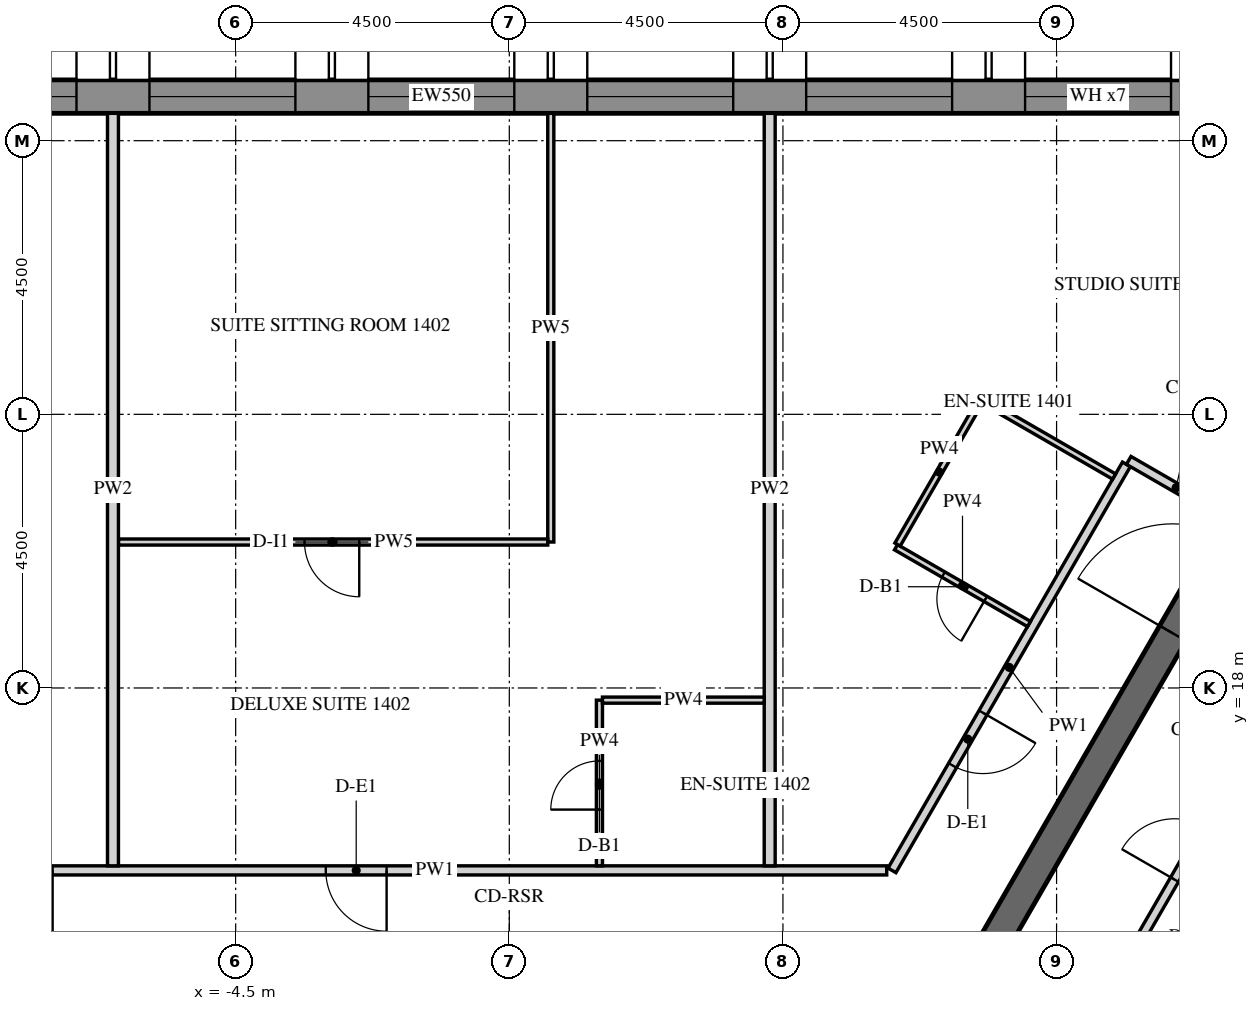
"""IFC4 building model, lengths in metres.
Left out: names, types, materials, properties, quantities, classifications, styles, units other than length and angle.
Written with IfcOpenShell. Run it as: python <this file> out.ifc"""

import sys

from ifc_helpers import new_model, si_unit, direction, frame, frame_2d, origin, place, context, subcontext, project, spatial, polyline, rectangle, outline, extrude, element, fill, save


model = new_model("IFC4")
c1 = context("Model", 3, precision=1e-05, world=origin(), true_north=direction((0.0, 1.0)))
c2 = subcontext(c1, "Body", "Model", "MODEL_VIEW")
j1 = project(units=[si_unit("LENGTHUNIT", "METRE"), si_unit("PLANEANGLEUNIT", "RADIAN")], contexts=[c1])
p1 = place(None, origin())
s1 = spatial("IfcSite", under=j1, at=p1, CompositionType="ELEMENT")
p2 = place(p1, origin())
s2 = spatial("IfcBuilding", under=s1, at=p2, CompositionType="ELEMENT")
p3 = place(p2, frame((0.0, 0.0, 183.9)))
s3 = spatial("IfcBuildingStorey", under=s2, at=p3, CompositionType="ELEMENT", Elevation=183.9)
p4 = place(p3, frame((12.761, 27.725, -0.15), z_axis=(0.0, 0.0, 1.0), x_axis=(-1.0, 0.0, 0.0)))
e1 = element("IfcWall", 1, at=p4, inside=s3, PredefinedType="SOLIDWALL", context=c2, shape_type="SweptSolid", body=[
    extrude(outline(polyline([(-0.022, -0.275), (27.783, -0.275), (27.732, 0.275), (0.022, 0.275), (-0.022, -0.275)])), origin(), (0.0, 0.0, 1.0), 3.9),
])
p5 = place(p4, frame((1.879, 0.0, 1.05)))
e2 = element("IfcOpeningElement", 2, at=p5, cuts=e1, PredefinedType="OPENING", context=c2, shape_type="SweptSolid", body=[
    extrude(rectangle(XDim=2.4, YDim=2.4, at=frame_2d((1.2, 1.2))), frame((0.0, 0.285, 0.0), z_axis=(0.0, -1.0, 0.0), x_axis=(1.0, 0.0, 0.0)), (0.0, 0.0, 1.0), 0.57),
])
p6 = place(p4, frame((5.479, 0.0, 1.05)))
e3 = element("IfcOpeningElement", 3, at=p6, cuts=e1, PredefinedType="OPENING", context=c2, shape_type="SweptSolid", body=[
    extrude(rectangle(XDim=2.4, YDim=2.4, at=frame_2d((1.2, 1.2))), frame((0.0, 0.285, 0.0), z_axis=(0.0, -1.0, 0.0), x_axis=(1.0, 0.0, 0.0)), (0.0, 0.0, 1.0), 0.57),
])
p7 = place(p4, frame((9.079, 0.0, 1.05)))
e4 = element("IfcOpeningElement", 4, at=p7, cuts=e1, PredefinedType="OPENING", context=c2, shape_type="SweptSolid", body=[
    extrude(rectangle(XDim=2.4, YDim=2.4, at=frame_2d((1.2, 1.2))), frame((0.0, 0.285, 0.0), z_axis=(0.0, -1.0, 0.0), x_axis=(1.0, 0.0, 0.0)), (0.0, 0.0, 1.0), 0.57),
])
p8 = place(p4, frame((12.679, 0.0, 1.05)))
e5 = element("IfcOpeningElement", 5, at=p8, cuts=e1, PredefinedType="OPENING", context=c2, shape_type="SweptSolid", body=[
    extrude(rectangle(XDim=2.4, YDim=2.4, at=frame_2d((1.2, 1.2))), frame((0.0, 0.285, 0.0), z_axis=(0.0, -1.0, 0.0), x_axis=(1.0, 0.0, 0.0)), (0.0, 0.0, 1.0), 0.57),
])
p9 = place(p4, frame((16.279, 0.0, 1.05)))
e6 = element("IfcOpeningElement", 6, at=p9, cuts=e1, PredefinedType="OPENING", context=c2, shape_type="SweptSolid", body=[
    extrude(rectangle(XDim=2.4, YDim=2.4, at=frame_2d((1.2, 1.2))), frame((0.0, 0.285, 0.0), z_axis=(0.0, -1.0, 0.0), x_axis=(1.0, 0.0, 0.0)), (0.0, 0.0, 1.0), 0.57),
])
p10 = place(p4, frame((19.879, 0.0, 1.05)))
e7 = element("IfcOpeningElement", 7, at=p10, cuts=e1, PredefinedType="OPENING", context=c2, shape_type="SweptSolid", body=[
    extrude(rectangle(XDim=2.4, YDim=2.4, at=frame_2d((1.2, 1.2))), frame((0.0, 0.285, 0.0), z_axis=(0.0, -1.0, 0.0), x_axis=(1.0, 0.0, 0.0)), (0.0, 0.0, 1.0), 0.57),
])
p11 = place(p4, frame((23.479, 0.0, 1.05)))
e8 = element("IfcOpeningElement", 8, at=p11, cuts=e1, PredefinedType="OPENING", context=c2, shape_type="SweptSolid", body=[
    extrude(rectangle(XDim=2.4, YDim=2.4, at=frame_2d((1.2, 1.2))), frame((0.0, 0.285, 0.0), z_axis=(0.0, -1.0, 0.0), x_axis=(1.0, 0.0, 0.0)), (0.0, 0.0, 1.0), 0.57),
])
p12 = place(p3, frame((7.506, 13.0, -0.15), z_axis=(0.0, 0.0, 1.0), x_axis=(0.499988271576, 0.866032175087, 0.0)))
e9 = element("IfcWall", 9, at=p12, inside=s3, PredefinedType="SHEAR", context=c2, shape_type="SweptSolid", body=[
    extrude(rectangle(XDim=15.424, YDim=0.5, at=frame_2d((7.712, 0.0))), origin(), (0.0, 0.0, 1.0), 3.9),
])
p13 = place(p12, frame((6.812, 0.0, 0.15)))
e10 = element("IfcOpeningElement", 10, at=p13, cuts=e9, PredefinedType="OPENING", context=c2, shape_type="SweptSolid", body=[
    extrude(rectangle(XDim=1.8, YDim=2.4, at=frame_2d((0.9, 1.2))), frame((0.0, 0.26, 0.0), z_axis=(0.0, -1.0, 0.0), x_axis=(1.0, 0.0, 0.0)), (0.0, 0.0, 1.0), 0.52),
])
p14 = place(p3, frame((10.149, 21.678, 0.0), z_axis=(0.0, 0.0, 1.0), x_axis=(-0.499993780622, -0.866028994514, 0.0)))
e11 = element("IfcWall", 11, at=p14, inside=s3, PredefinedType="PARTITIONING", context=c2, shape_type="SweptSolid", body=[
    extrude(rectangle(XDim=7.711, YDim=0.15, at=frame_2d((3.855, 0.0))), origin(), (0.0, 0.0, 1.0), 2.988),
])
p15 = place(p14, frame((4.718, 0.0, 0.0)))
e12 = element("IfcOpeningElement", 12, at=p15, cuts=e11, PredefinedType="OPENING", context=c2, shape_type="SweptSolid", body=[
    extrude(rectangle(XDim=1.0, YDim=2.1, at=frame_2d((0.5, 1.05))), frame((0.0, 0.085, 0.0), z_axis=(0.0, -1.0, 0.0), x_axis=(1.0, 0.0, 0.0)), (0.0, 0.0, 1.0), 0.17),
])
p16 = place(p3, frame((6.207, 15.0, 0.0), z_axis=(0.0, 0.0, 1.0), x_axis=(-1.0, 0.0, 0.0)))
e13 = element("IfcWall", 13, at=p16, inside=s3, PredefinedType="PARTITIONING", context=c2, shape_type="SweptSolid", body=[
    extrude(rectangle(XDim=14.867, YDim=0.15, at=frame_2d((7.433, 0.0))), origin(), (0.0, 0.0, 1.0), 2.988),
])
p17 = place(p16, frame((8.224, 0.0, 0.0)))
e14 = element("IfcOpeningElement", 14, at=p17, cuts=e13, PredefinedType="OPENING", context=c2, shape_type="SweptSolid", body=[
    extrude(rectangle(XDim=1.0, YDim=2.1, at=frame_2d((0.5, 1.05))), frame((0.0, 0.085, 0.0), z_axis=(0.0, -1.0, 0.0), x_axis=(1.0, 0.0, 0.0)), (0.0, 0.0, 1.0), 0.17),
])
p18 = place(p16, frame((13.717, 0.0, 0.0)))
e15 = element("IfcOpeningElement", 15, at=p18, cuts=e13, PredefinedType="OPENING", context=c2, shape_type="SweptSolid", body=[
    extrude(rectangle(XDim=1.0, YDim=2.1, at=frame_2d((0.5, 1.05))), frame((0.0, 0.085, 0.0), z_axis=(0.0, -1.0, 0.0), x_axis=(1.0, 0.0, 0.0)), (0.0, 0.0, 1.0), 0.17),
])
p19 = place(p3, frame((11.745, 20.843, 0.0), z_axis=(0.0, 0.0, 1.0), x_axis=(-0.865989075817, 0.500062916607, 0.0)))
e16 = element("IfcWall", 16, at=p19, inside=s3, PredefinedType="PARTITIONING", context=c2, shape_type="SweptSolid", body=[
    extrude(rectangle(XDim=1.8, YDim=0.15, at=frame_2d((0.9, 0.0))), origin(), (0.0, 0.0, 1.0), 2.988),
])
p20 = place(p3, frame((9.887, 13.025, 0.0), z_axis=(0.0, 0.0, 1.0), x_axis=(0.499985955615, 0.866033512162, 0.0)))
e17 = element("IfcWall", 17, at=p20, inside=s3, PredefinedType="PARTITIONING", context=c2, shape_type="SweptSolid", body=[
    extrude(rectangle(XDim=7.699, YDim=0.15, at=frame_2d((3.85, 0.0))), origin(), (0.0, 0.0, 1.0), 2.988),
])
p21 = place(p20, frame((2.106, 0.0, 0.0)))
e18 = element("IfcOpeningElement", 18, at=p21, cuts=e17, PredefinedType="OPENING", context=c2, shape_type="SweptSolid", body=[
    extrude(rectangle(XDim=1.0, YDim=2.1, at=frame_2d((0.5, 1.05))), frame((0.0, 0.085, 0.0), z_axis=(0.0, -1.0, 0.0), x_axis=(1.0, 0.0, 0.0)), (0.0, 0.0, 1.0), 0.17),
])
p22 = place(p3, frame((8.546, 19.052, 0.0), z_axis=(0.0, 0.0, 1.0), x_axis=(-0.866039067339, 0.499976333282, 0.0)))
e19 = element("IfcWall", 19, at=p22, inside=s3, PredefinedType="PARTITIONING", context=c2, shape_type="SweptSolid", body=[
    extrude(rectangle(XDim=2.525, YDim=0.1, at=frame_2d((1.262, 0.0))), origin(), (0.0, 0.0, 1.0), 2.988),
])
p23 = place(p22, frame((0.825, 0.0, 0.0)))
e20 = element("IfcOpeningElement", 20, at=p23, cuts=e19, PredefinedType="OPENING", context=c2, shape_type="SweptSolid", body=[
    extrude(rectangle(XDim=0.8, YDim=2.1, at=frame_2d((0.4, 1.05))), frame((0.0, 0.06, 0.0), z_axis=(0.0, -1.0, 0.0), x_axis=(1.0, 0.0, 0.0)), (0.0, 0.0, 1.0), 0.12),
])
p24 = place(p3, frame((6.385, 20.358, 0.0), z_axis=(0.0, 0.0, 1.0), x_axis=(0.499996545922, 0.866027397988, 0.0)))
e21 = element("IfcWall", 21, at=p24, inside=s3, PredefinedType="PARTITIONING", context=c2, shape_type="SweptSolid", body=[
    extrude(rectangle(XDim=2.75, YDim=0.1, at=frame_2d((1.375, 0.0))), origin(), (0.0, 0.0, 1.0), 2.988),
])
p25 = place(p3, frame((7.803, 22.715, 0.0), z_axis=(0.0, 0.0, 1.0), x_axis=(0.866006523861, -0.500032699561, 0.0)))
e22 = element("IfcWall", 22, at=p25, inside=s3, PredefinedType="PARTITIONING", context=c2, shape_type="SweptSolid", body=[
    extrude(rectangle(XDim=2.475, YDim=0.1, at=frame_2d((1.237, 0.0))), origin(), (0.0, 0.0, 1.0), 2.988),
])
p26 = place(p3, frame((4.282, 27.45, 0.0), z_axis=(0.0, 0.0, 1.0), x_axis=(0.0, -1.0, 0.0)))
e23 = element("IfcWall", 23, at=p26, inside=s3, PredefinedType="PARTITIONING", context=c2, shape_type="SweptSolid", body=[
    extrude(rectangle(XDim=12.375, YDim=0.18, at=frame_2d((6.188, 0.0))), origin(), (0.0, 0.0, 1.0), 2.988),
])
p27 = place(p3, frame((1.482, 15.075, 0.0), z_axis=(0.0, 0.0, 1.0), x_axis=(0.0, 1.0, 0.0)))
e24 = element("IfcWall", 24, at=p27, inside=s3, PredefinedType="PARTITIONING", context=c2, shape_type="SweptSolid", body=[
    extrude(rectangle(XDim=2.725, YDim=0.1, at=frame_2d((1.363, 0.0))), origin(), (0.0, 0.0, 1.0), 2.988),
])
p28 = place(p27, frame((0.925, 0.0, 0.0)))
e25 = element("IfcOpeningElement", 25, at=p28, cuts=e24, PredefinedType="OPENING", context=c2, shape_type="SweptSolid", body=[
    extrude(rectangle(XDim=0.8, YDim=2.1, at=frame_2d((0.4, 1.05))), frame((0.0, 0.06, 0.0), z_axis=(0.0, -1.0, 0.0), x_axis=(1.0, 0.0, 0.0)), (0.0, 0.0, 1.0), 0.12),
])
p29 = place(p3, frame((1.532, 17.8, 0.0), z_axis=(0.0, 0.0, 1.0), x_axis=(1.0, 0.0, 0.0)))
e26 = element("IfcWall", 26, at=p29, inside=s3, PredefinedType="PARTITIONING", context=c2, shape_type="SweptSolid", body=[
    extrude(rectangle(XDim=2.66, YDim=0.1, at=frame_2d((1.33, 0.0))), origin(), (0.0, 0.0, 1.0), 2.988),
])
p30 = place(p3, frame((0.682, 27.45, 0.0), z_axis=(0.0, 0.0, 1.0), x_axis=(0.0, -1.0, 0.0)))
e27 = element("IfcWall", 27, at=p30, inside=s3, PredefinedType="PARTITIONING", context=c2, shape_type="SweptSolid", body=[
    extrude(rectangle(XDim=7.05, YDim=0.1, at=frame_2d((3.525, 0.0))), origin(), (0.0, 0.0, 1.0), 2.988),
])
p31 = place(p3, frame((0.632, 20.4, 0.0), z_axis=(0.0, 0.0, 1.0), x_axis=(-1.0, 0.0, 0.0)))
e28 = element("IfcWall", 28, at=p31, inside=s3, PredefinedType="PARTITIONING", context=c2, shape_type="SweptSolid", body=[
    extrude(rectangle(XDim=7.06, YDim=0.1, at=frame_2d((3.53, 0.0))), origin(), (0.0, 0.0, 1.0), 2.988),
])
p32 = place(p31, frame((3.1, 0.0, 0.0)))
e29 = element("IfcOpeningElement", 29, at=p32, cuts=e28, PredefinedType="OPENING", context=c2, shape_type="SweptSolid", body=[
    extrude(rectangle(XDim=0.9, YDim=2.1, at=frame_2d((0.45, 1.05))), frame((0.0, 0.06, 0.0), z_axis=(0.0, -1.0, 0.0), x_axis=(1.0, 0.0, 0.0)), (0.0, 0.0, 1.0), 0.12),
])
p33 = place(p3, frame((-6.518, 27.45, 0.0), z_axis=(0.0, 0.0, 1.0), x_axis=(0.0, -1.0, 0.0)))
e30 = element("IfcWall", 30, at=p33, inside=s3, PredefinedType="PARTITIONING", context=c2, shape_type="SweptSolid", body=[
    extrude(rectangle(XDim=12.375, YDim=0.18, at=frame_2d((6.188, 0.0))), origin(), (0.0, 0.0, 1.0), 2.988),
])
p34 = place(p3, frame((20.363, 18.9, 0.0), z_axis=(0.0, 0.0, 1.0), x_axis=(-0.829027307641, -0.559208121531, 0.0)))
e31 = element("IfcWall", 31, at=p34, inside=s3, PredefinedType="PARTITIONING", context=c2, shape_type="SweptSolid", body=[
    extrude(rectangle(XDim=12.039, YDim=0.18, at=frame_2d((6.02, 0.0))), origin(), (0.0, 0.0, 1.0), 2.988),
])
p35 = place(p5, frame((0.0, 0.205, 0.0)))
e32 = element("IfcWindow", 32, at=p35, inside=s3, PartitioningType="DOUBLE_PANEL_VERTICAL", PredefinedType="WINDOW", context=c2, shape_type="SweptSolid", body=[
    extrude(rectangle(XDim=2.4, YDim=2.4, at=frame_2d((1.2, 1.2))), frame((0.0, 0.03, 0.0), z_axis=(0.0, -1.0, 0.0), x_axis=(1.0, 0.0, 0.0)), (0.0, 0.0, 1.0), 0.06),
])
fill(e2, e32)
p36 = place(p6, frame((0.0, 0.205, 0.0)))
e33 = element("IfcWindow", 33, at=p36, inside=s3, PartitioningType="DOUBLE_PANEL_VERTICAL", PredefinedType="WINDOW", context=c2, shape_type="SweptSolid", body=[
    extrude(rectangle(XDim=2.4, YDim=2.4, at=frame_2d((1.2, 1.2))), frame((0.0, 0.03, 0.0), z_axis=(0.0, -1.0, 0.0), x_axis=(1.0, 0.0, 0.0)), (0.0, 0.0, 1.0), 0.06),
])
fill(e3, e33)
p37 = place(p7, frame((0.0, 0.205, 0.0)))
e34 = element("IfcWindow", 34, at=p37, inside=s3, PartitioningType="DOUBLE_PANEL_VERTICAL", PredefinedType="WINDOW", context=c2, shape_type="SweptSolid", body=[
    extrude(rectangle(XDim=2.4, YDim=2.4, at=frame_2d((1.2, 1.2))), frame((0.0, 0.03, 0.0), z_axis=(0.0, -1.0, 0.0), x_axis=(1.0, 0.0, 0.0)), (0.0, 0.0, 1.0), 0.06),
])
fill(e4, e34)
p38 = place(p8, frame((0.0, 0.205, 0.0)))
e35 = element("IfcWindow", 35, at=p38, inside=s3, PartitioningType="DOUBLE_PANEL_VERTICAL", PredefinedType="WINDOW", context=c2, shape_type="SweptSolid", body=[
    extrude(rectangle(XDim=2.4, YDim=2.4, at=frame_2d((1.2, 1.2))), frame((0.0, 0.03, 0.0), z_axis=(0.0, -1.0, 0.0), x_axis=(1.0, 0.0, 0.0)), (0.0, 0.0, 1.0), 0.06),
])
fill(e5, e35)
p39 = place(p9, frame((0.0, 0.205, 0.0)))
e36 = element("IfcWindow", 36, at=p39, inside=s3, PartitioningType="DOUBLE_PANEL_VERTICAL", PredefinedType="WINDOW", context=c2, shape_type="SweptSolid", body=[
    extrude(rectangle(XDim=2.4, YDim=2.4, at=frame_2d((1.2, 1.2))), frame((0.0, 0.03, 0.0), z_axis=(0.0, -1.0, 0.0), x_axis=(1.0, 0.0, 0.0)), (0.0, 0.0, 1.0), 0.06),
])
fill(e6, e36)
p40 = place(p10, frame((0.0, 0.205, 0.0)))
e37 = element("IfcWindow", 37, at=p40, inside=s3, PartitioningType="DOUBLE_PANEL_VERTICAL", PredefinedType="WINDOW", context=c2, shape_type="SweptSolid", body=[
    extrude(rectangle(XDim=2.4, YDim=2.4, at=frame_2d((1.2, 1.2))), frame((0.0, 0.03, 0.0), z_axis=(0.0, -1.0, 0.0), x_axis=(1.0, 0.0, 0.0)), (0.0, 0.0, 1.0), 0.06),
])
fill(e7, e37)
p41 = place(p13, origin())
e38 = element("IfcDoor", 38, at=p41, inside=s3, OperationType="DOUBLE_DOOR_SINGLE_SWING", PredefinedType="DOOR", context=c2, shape_type="SweptSolid", body=[
    extrude(rectangle(XDim=1.8, YDim=2.4, at=frame_2d((0.9, 1.2))), frame((0.0, 0.025, 0.0), z_axis=(0.0, -1.0, 0.0), x_axis=(1.0, 0.0, 0.0)), (0.0, 0.0, 1.0), 0.05),
])
fill(e10, e38)
p42 = place(p15, origin())
e39 = element("IfcDoor", 39, at=p42, inside=s3, OperationType="SINGLE_SWING_LEFT", PredefinedType="DOOR", context=c2, shape_type="SweptSolid", body=[
    extrude(rectangle(XDim=1.0, YDim=2.1, at=frame_2d((0.5, 1.05))), frame((0.0, 0.025, 0.0), z_axis=(0.0, -1.0, 0.0), x_axis=(1.0, 0.0, 0.0)), (0.0, 0.0, 1.0), 0.05),
])
fill(e12, e39)
p43 = place(p23, origin())
e40 = element("IfcDoor", 40, at=p43, inside=s3, OperationType="SINGLE_SWING_RIGHT", PredefinedType="DOOR", context=c2, shape_type="SweptSolid", body=[
    extrude(rectangle(XDim=0.8, YDim=2.1, at=frame_2d((0.4, 1.05))), frame((0.0, 0.025, 0.0), z_axis=(0.0, -1.0, 0.0), x_axis=(1.0, 0.0, 0.0)), (0.0, 0.0, 1.0), 0.05),
])
fill(e20, e40)
p44 = place(p17, origin())
e41 = element("IfcDoor", 41, at=p44, inside=s3, OperationType="SINGLE_SWING_RIGHT", PredefinedType="DOOR", context=c2, shape_type="SweptSolid", body=[
    extrude(rectangle(XDim=1.0, YDim=2.1, at=frame_2d((0.5, 1.05))), frame((0.0, 0.025, 0.0), z_axis=(0.0, -1.0, 0.0), x_axis=(1.0, 0.0, 0.0)), (0.0, 0.0, 1.0), 0.05),
])
fill(e14, e41)
p45 = place(p28, origin())
e42 = element("IfcDoor", 42, at=p45, inside=s3, OperationType="SINGLE_SWING_RIGHT", PredefinedType="DOOR", context=c2, shape_type="SweptSolid", body=[
    extrude(rectangle(XDim=0.8, YDim=2.1, at=frame_2d((0.4, 1.05))), frame((0.0, 0.025, 0.0), z_axis=(0.0, -1.0, 0.0), x_axis=(1.0, 0.0, 0.0)), (0.0, 0.0, 1.0), 0.05),
])
fill(e25, e42)
p46 = place(p32, origin())
e43 = element("IfcDoor", 43, at=p46, inside=s3, OperationType="SINGLE_SWING_LEFT", PredefinedType="DOOR", context=c2, shape_type="SweptSolid", body=[
    extrude(rectangle(XDim=0.9, YDim=2.1, at=frame_2d((0.45, 1.05))), frame((0.0, 0.025, 0.0), z_axis=(0.0, -1.0, 0.0), x_axis=(1.0, 0.0, 0.0)), (0.0, 0.0, 1.0), 0.05),
])
fill(e29, e43)
p47 = place(p18, origin())
e44 = element("IfcDoor", 44, at=p47, inside=s3, OperationType="SINGLE_SWING_LEFT", PredefinedType="DOOR", context=c2, shape_type="SweptSolid", body=[
    extrude(rectangle(XDim=1.0, YDim=2.1, at=frame_2d((0.5, 1.05))), frame((0.0, 0.025, 0.0), z_axis=(0.0, -1.0, 0.0), x_axis=(1.0, 0.0, 0.0)), (0.0, 0.0, 1.0), 0.05),
])
fill(e15, e44)
p48 = place(p21, origin())
e45 = element("IfcDoor", 45, at=p48, inside=s3, OperationType="SINGLE_SWING_RIGHT", PredefinedType="DOOR", context=c2, shape_type="SweptSolid", body=[
    extrude(rectangle(XDim=1.0, YDim=2.1, at=frame_2d((0.5, 1.05))), frame((0.0, 0.025, 0.0), z_axis=(0.0, -1.0, 0.0), x_axis=(1.0, 0.0, 0.0)), (0.0, 0.0, 1.0), 0.05),
])
fill(e18, e45)
save(model, sys.argv[1])
